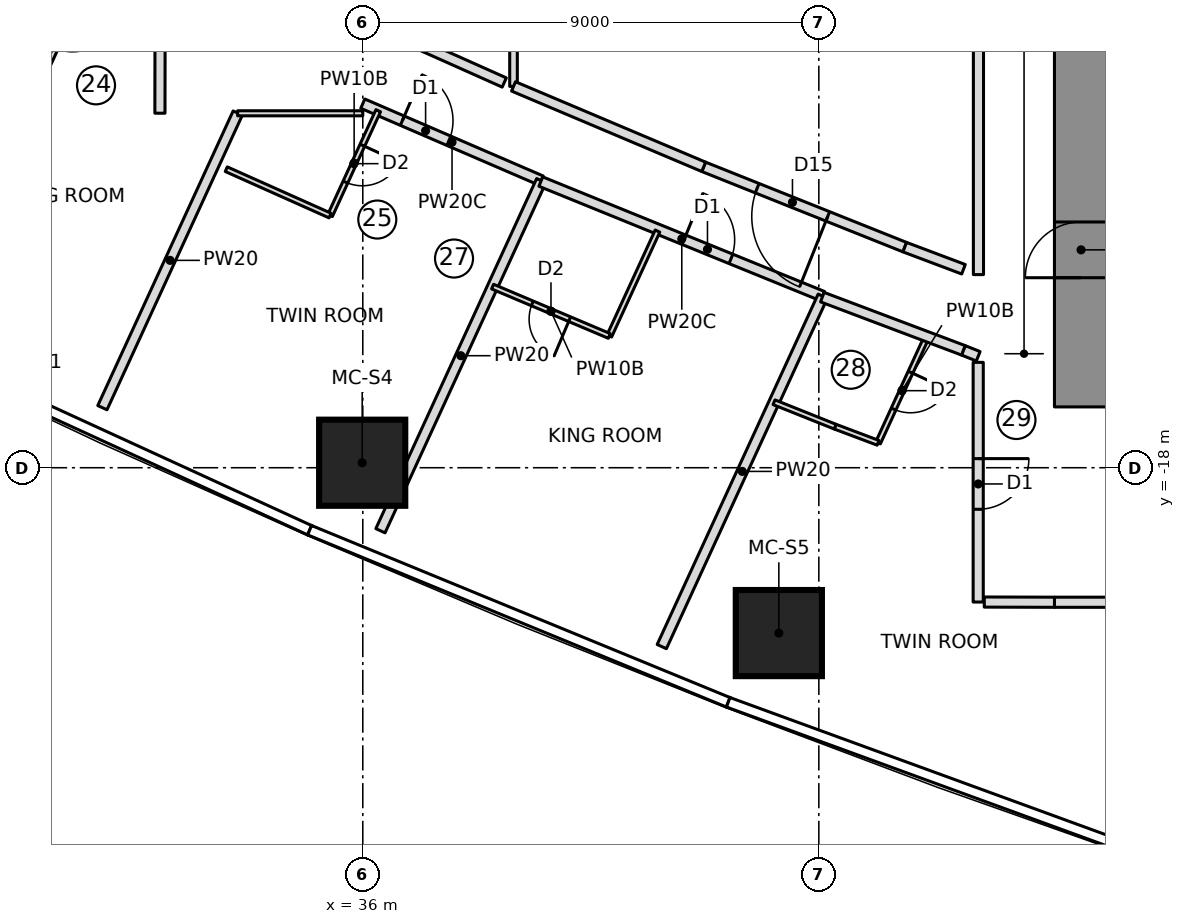
"""IFC4 building model, lengths in metres.
Left out: names, types, materials, properties, quantities, classifications, styles, units other than length and angle.
Written with IfcOpenShell. Run it as: python <this file> out.ifc"""

import sys

from ifc_helpers import new_model, si_unit, direction, frame, frame_2d, origin, origin_2d, place, context, subcontext, project, spatial, rectangle, extrude, element, fill, save


model = new_model("IFC4")
c1 = context("Model", 3, precision=1e-05, world=origin(), true_north=direction((0.0, 1.0)))
c2 = subcontext(c1, "Body", "Model", "MODEL_VIEW")
j1 = project(units=[si_unit("LENGTHUNIT", "METRE"), si_unit("PLANEANGLEUNIT", "RADIAN")], contexts=[c1])
p1 = place(None, origin())
s1 = spatial("IfcSite", under=j1, at=p1, CompositionType="ELEMENT")
p2 = place(p1, origin())
s2 = spatial("IfcBuilding", under=s1, at=p2, CompositionType="ELEMENT")
p3 = place(p2, frame((0.0, 0.0, 106.2)))
s3 = spatial("IfcBuildingStorey", under=s2, at=p3, CompositionType="ELEMENT", Elevation=106.2)
p4 = place(p3, frame((50.175, -16.8, 0.0), z_axis=(0.0, 0.0, 1.0), x_axis=(0.0, 1.0, 0.0)))
e1 = element("IfcWall", 1, at=p4, inside=s3, PredefinedType="SHEAR", context=c2, shape_type="SweptSolid", body=[
    extrude(rectangle(XDim=10.15, YDim=1.05, at=frame_2d((5.075, 0.0))), origin(), (0.0, 0.0, 1.0), 3.55),
])
p5 = place(p4, frame((2.55, 0.0, 0.0)))
e2 = element("IfcOpeningElement", 2, at=p5, cuts=e1, PredefinedType="OPENING", context=c2, shape_type="SweptSolid", body=[
    extrude(rectangle(XDim=1.1, YDim=2.1, at=frame_2d((0.55, 1.05))), frame((0.0, 0.535, 0.0), z_axis=(0.0, -1.0, 0.0), x_axis=(1.0, 0.0, 0.0)), (0.0, 0.0, 1.0), 1.07),
])
for number, where, z_axis, x_axis in (
    (3, (35.988, -17.902, 0.0), (0.0, 0.0, 1.0), (1.0, 0.0, 0.0)),
    (4, (44.211, -21.264, 0.0), (0.0, 0.0, 1.0), (1.0, 0.0, 0.0)),
):
    element("IfcColumn", number, at=place(p3, frame(where, z_axis=z_axis, x_axis=x_axis)), inside=s3, PredefinedType="COLUMN", context=c2, shape_type="SweptSolid", body=[
        extrude(rectangle(XDim=1.7, YDim=1.7, at=origin_2d()), origin(), (0.0, 0.0, 1.0), 3.55),
    ])
p6 = place(p3, frame((30.586, -8.31, 0.0), z_axis=(0.0, 0.0, 1.0), x_axis=(-0.417466676952, -0.908692232626, 0.0)))
e5 = element("IfcWall", 5, at=p6, inside=s3, PredefinedType="PARTITIONING", context=c2, shape_type="SweptSolid", body=[
    extrude(rectangle(XDim=2.277, YDim=0.1, at=frame_2d((1.139, 0.0))), origin(), (0.0, 0.0, 1.0), 3.25),
])
p7 = place(p6, frame((0.75, 0.0, 0.0)))
e6 = element("IfcOpeningElement", 6, at=p7, cuts=e5, PredefinedType="OPENING", context=c2, shape_type="SweptSolid", body=[
    extrude(rectangle(XDim=0.8, YDim=2.1, at=frame_2d((0.4, 1.05))), frame((0.0, 0.06, 0.0), z_axis=(0.0, -1.0, 0.0), x_axis=(1.0, 0.0, 0.0)), (0.0, 0.0, 1.0), 0.12),
])
p8 = place(p3, frame((30.861, -16.815, 0.0), z_axis=(0.0, 0.0, 1.0), x_axis=(0.417441426461, 0.908703832651, 0.0)))
e7 = element("IfcWall", 7, at=p8, inside=s3, PredefinedType="PARTITIONING", context=c2, shape_type="SweptSolid", body=[
    extrude(rectangle(XDim=6.399, YDim=0.2, at=frame_2d((3.2, 0.0))), origin(), (0.0, 0.0, 1.0), 3.25),
])
p9 = place(p3, frame((36.0, -10.815, 0.0), z_axis=(0.0, 0.0, 1.0), x_axis=(0.918174446699, -0.396176331233, 0.0)))
e8 = element("IfcWall", 8, at=p9, inside=s3, PredefinedType="PARTITIONING", context=c2, shape_type="SweptSolid", body=[
    extrude(rectangle(XDim=3.836, YDim=0.2, at=frame_2d((1.918, 0.0))), origin(), (0.0, 0.0, 1.0), 3.25),
])
p10 = place(p9, frame((0.85, 0.0, 0.0)))
e9 = element("IfcOpeningElement", 9, at=p10, cuts=e8, PredefinedType="OPENING", context=c2, shape_type="SweptSolid", body=[
    extrude(rectangle(XDim=1.0, YDim=2.1, at=frame_2d((0.5, 1.05))), frame((0.0, 0.11, 0.0), z_axis=(0.0, -1.0, 0.0), x_axis=(1.0, 0.0, 0.0)), (0.0, 0.0, 1.0), 0.22),
])
p11 = place(p3, frame((36.305, -10.954, 0.0), z_axis=(0.0, 0.0, 1.0), x_axis=(-0.41750734959, -0.908673545911, 0.0)))
e10 = element("IfcWall", 10, at=p11, inside=s3, PredefinedType="PARTITIONING", context=c2, shape_type="SweptSolid", body=[
    extrude(rectangle(XDim=2.277, YDim=0.1, at=frame_2d((1.139, 0.0))), origin(), (0.0, 0.0, 1.0), 3.25),
])
p12 = place(p11, frame((0.75, 0.0, 0.0)))
e11 = element("IfcOpeningElement", 11, at=p12, cuts=e10, PredefinedType="OPENING", context=c2, shape_type="SweptSolid", body=[
    extrude(rectangle(XDim=0.8, YDim=2.1, at=frame_2d((0.4, 1.05))), frame((0.0, 0.06, 0.0), z_axis=(0.0, -1.0, 0.0), x_axis=(1.0, 0.0, 0.0)), (0.0, 0.0, 1.0), 0.12),
])
p13 = place(p3, frame((35.354, -13.023, 0.0), z_axis=(0.0, 0.0, 1.0), x_axis=(-0.913060453705, 0.407824236504, 0.0)))
e12 = element("IfcWall", 12, at=p13, inside=s3, PredefinedType="PARTITIONING", context=c2, shape_type="SweptSolid", body=[
    extrude(rectangle(XDim=2.243, YDim=0.1, at=frame_2d((1.122, 0.0))), origin(), (0.0, 0.0, 1.0), 3.25),
])
p14 = place(p3, frame((36.348, -19.244, 0.0), z_axis=(0.0, 0.0, 1.0), x_axis=(0.417442847913, 0.908703179661, 0.0)))
e13 = element("IfcWall", 13, at=p14, inside=s3, PredefinedType="PARTITIONING", context=c2, shape_type="SweptSolid", body=[
    extrude(rectangle(XDim=7.604, YDim=0.2, at=frame_2d((3.802, 0.0))), origin(), (0.0, 0.0, 1.0), 3.25),
])
p15 = place(p3, frame((39.514, -12.353, 0.0), z_axis=(0.0, 0.0, 1.0), x_axis=(0.926327862679, -0.376718317613, 0.0)))
e14 = element("IfcWall", 14, at=p15, inside=s3, PredefinedType="PARTITIONING", context=c2, shape_type="SweptSolid", body=[
    extrude(rectangle(XDim=6.006, YDim=0.2, at=frame_2d((3.003, 0.0))), origin(), (0.0, 0.0, 1.0), 3.25),
])
p16 = place(p15, frame((3.05, 0.0, 0.0)))
e15 = element("IfcOpeningElement", 15, at=p16, cuts=e14, PredefinedType="OPENING", context=c2, shape_type="SweptSolid", body=[
    extrude(rectangle(XDim=1.0, YDim=2.1, at=frame_2d((0.5, 1.05))), frame((0.0, 0.11, 0.0), z_axis=(0.0, -1.0, 0.0), x_axis=(1.0, 0.0, 0.0)), (0.0, 0.0, 1.0), 0.22),
])
p17 = place(p3, frame((41.816, -13.33, 0.0), z_axis=(0.0, 0.0, 1.0), x_axis=(-0.417433204355, -0.908707609686, 0.0)))
e16 = element("IfcWall", 16, at=p17, inside=s3, PredefinedType="PARTITIONING", context=c2, shape_type="SweptSolid", body=[
    extrude(rectangle(XDim=2.278, YDim=0.1, at=frame_2d((1.139, 0.0))), origin(), (0.0, 0.0, 1.0), 3.25),
])
p18 = place(p3, frame((40.865, -15.4, 0.0), z_axis=(0.0, 0.0, 1.0), x_axis=(-0.921042675983, 0.38946166566, 0.0)))
e17 = element("IfcWall", 17, at=p18, inside=s3, PredefinedType="PARTITIONING", context=c2, shape_type="SweptSolid", body=[
    extrude(rectangle(XDim=2.501, YDim=0.1, at=frame_2d((1.25, 0.0))), origin(), (0.0, 0.0, 1.0), 3.25),
])
p19 = place(p18, frame((0.85, 0.0, 0.0)))
e18 = element("IfcOpeningElement", 18, at=p19, cuts=e17, PredefinedType="OPENING", context=c2, shape_type="SweptSolid", body=[
    extrude(rectangle(XDim=0.8, YDim=2.1, at=frame_2d((0.4, 1.05))), frame((0.0, 0.06, 0.0), z_axis=(0.0, -1.0, 0.0), x_axis=(1.0, 0.0, 0.0)), (0.0, 0.0, 1.0), 0.12),
])
p20 = place(p3, frame((41.901, -21.53, 0.0), z_axis=(0.0, 0.0, 1.0), x_axis=(0.417427858403, 0.908710065438, 0.0)))
e19 = element("IfcWall", 19, at=p20, inside=s3, PredefinedType="PARTITIONING", context=c2, shape_type="SweptSolid", body=[
    extrude(rectangle(XDim=7.61, YDim=0.2, at=frame_2d((3.805, 0.0))), origin(), (0.0, 0.0, 1.0), 3.25),
])
p21 = place(p3, frame((47.122, -15.434, 0.0), z_axis=(0.0, 0.0, 1.0), x_axis=(-0.417409478396, -0.90871850831, 0.0)))
e20 = element("IfcWall", 20, at=p21, inside=s3, PredefinedType="PARTITIONING", context=c2, shape_type="SweptSolid", body=[
    extrude(rectangle(XDim=2.283, YDim=0.1, at=frame_2d((1.142, 0.0))), origin(), (0.0, 0.0, 1.0), 3.25),
])
p22 = place(p21, frame((0.75, 0.0, 0.0)))
e21 = element("IfcOpeningElement", 21, at=p22, cuts=e20, PredefinedType="OPENING", context=c2, shape_type="SweptSolid", body=[
    extrude(rectangle(XDim=0.8, YDim=2.1, at=frame_2d((0.4, 1.05))), frame((0.0, 0.06, 0.0), z_axis=(0.0, -1.0, 0.0), x_axis=(1.0, 0.0, 0.0)), (0.0, 0.0, 1.0), 0.12),
])
p23 = place(p3, frame((46.169, -17.509, 0.0), z_axis=(0.0, 0.0, 1.0), x_axis=(-0.935885332459, 0.352304760808, 0.0)))
e22 = element("IfcWall", 22, at=p23, inside=s3, PredefinedType="PARTITIONING", context=c2, shape_type="SweptSolid", body=[
    extrude(rectangle(XDim=0.906, YDim=0.1, at=frame_2d((0.453, 0.0))), origin(), (0.0, 0.0, 1.0), 3.25),
])
p24 = place(p3, frame((45.321, -17.19, 0.0), z_axis=(0.0, 0.0, 1.0), x_axis=(-0.928593389657, 0.371098796393, 0.0)))
e23 = element("IfcWall", 23, at=p24, inside=s3, PredefinedType="PARTITIONING", context=c2, shape_type="SweptSolid", body=[
    extrude(rectangle(XDim=1.298, YDim=0.1, at=frame_2d((0.649, 0.0))), origin(), (0.0, 0.0, 1.0), 3.25),
])
p25 = place(p3, frame((38.792, -10.397, 0.0), z_axis=(0.0, 0.0, 1.0), x_axis=(-0.913029587861, 0.407893333716, 0.0)))
e24 = element("IfcWall", 24, at=p25, inside=s3, PredefinedType="PARTITIONING", context=c2, shape_type="SweptSolid", body=[
    extrude(rectangle(XDim=3.058, YDim=0.2, at=frame_2d((1.529, 0.0))), origin(), (0.0, 0.0, 1.0), 3.25),
])
p26 = place(p3, frame((38.975, -10.474, 0.0), z_axis=(0.0, 0.0, 1.0), x_axis=(0.0, 1.0, 0.0)))
e25 = element("IfcWall", 25, at=p26, inside=s3, PredefinedType="PARTITIONING", context=c2, shape_type="SweptSolid", body=[
    extrude(rectangle(XDim=20.949, YDim=0.15, at=frame_2d((10.474, 0.0))), origin(), (0.0, 0.0, 1.0), 3.25),
])
p27 = place(p3, frame((46.696, -13.647, 0.0), z_axis=(0.0, 0.0, 1.0), x_axis=(-0.928638161177, 0.370986745864, 0.0)))
e26 = element("IfcWall", 26, at=p27, inside=s3, PredefinedType="PARTITIONING", context=c2, shape_type="SweptSolid", body=[
    extrude(rectangle(XDim=4.273, YDim=0.2, at=frame_2d((2.136, 0.0))), origin(), (0.0, 0.0, 1.0), 3.25),
])
p28 = place(p27, frame((1.636, 0.0, 0.0)))
e27 = element("IfcOpeningElement", 27, at=p28, cuts=e26, PredefinedType="OPENING", context=c2, shape_type="SweptSolid", body=[
    extrude(rectangle(XDim=1.5, YDim=2.1, at=frame_2d((0.75, 1.05))), frame((0.0, 0.11, 0.0), z_axis=(0.0, -1.0, 0.0), x_axis=(1.0, 0.0, 0.0)), (0.0, 0.0, 1.0), 0.22),
])
p29 = place(p3, frame((42.728, -12.062, 0.0), z_axis=(0.0, 0.0, 1.0), x_axis=(-0.921030909625, 0.389489490891, 0.0)))
e28 = element("IfcWall", 28, at=p29, inside=s3, PredefinedType="PARTITIONING", context=c2, shape_type="SweptSolid", body=[
    extrude(rectangle(XDim=4.075, YDim=0.2, at=frame_2d((2.038, 0.0))), origin(), (0.0, 0.0, 1.0), 3.25),
])
p30 = place(p3, frame((49.65, -20.655, 0.0), z_axis=(0.0, 0.0, 1.0), x_axis=(1.0, 0.0, 0.0)))
e29 = element("IfcWall", 29, at=p30, inside=s3, PredefinedType="PARTITIONING", context=c2, shape_type="SweptSolid", body=[
    extrude(rectangle(XDim=4.976, YDim=0.2, at=frame_2d((2.488, 0.0))), origin(), (0.0, 0.0, 1.0), 3.25),
])
p31 = place(p30, frame((1.988, 0.0, 0.0)))
e30 = element("IfcOpeningElement", 30, at=p31, cuts=e29, PredefinedType="OPENING", context=c2, shape_type="SweptSolid", body=[
    extrude(rectangle(XDim=1.5, YDim=2.1, at=frame_2d((0.75, 1.05))), frame((0.0, 0.11, 0.0), z_axis=(0.0, -1.0, 0.0), x_axis=(1.0, 0.0, 0.0)), (0.0, 0.0, 1.0), 0.22),
])
p32 = place(p3, frame((33.53, -11.005, 0.0), z_axis=(0.0, 0.0, 1.0), x_axis=(1.0, 0.0, 0.0)))
e31 = element("IfcWall", 31, at=p32, inside=s3, PredefinedType="PARTITIONING", context=c2, shape_type="SweptSolid", body=[
    extrude(rectangle(XDim=2.47, YDim=0.1, at=frame_2d((1.235, 0.0))), origin(), (0.0, 0.0, 1.0), 3.25),
])
p33 = place(p3, frame((45.069, -14.634, 0.0), z_axis=(0.0, 0.0, 1.0), x_axis=(0.93564003724, -0.352955692282, 0.0)))
e32 = element("IfcWall", 32, at=p33, inside=s3, PredefinedType="PARTITIONING", context=c2, shape_type="SweptSolid", body=[
    extrude(rectangle(XDim=2.978, YDim=0.2, at=frame_2d((1.489, 0.0))), origin(), (0.0, 0.0, 1.0), 3.25),
])
p34 = place(p3, frame((47.855, -14.083, 0.0), z_axis=(0.0, 0.0, 1.0), x_axis=(-0.935907269358, 0.352246480696, 0.0)))
e33 = element("IfcWall", 33, at=p34, inside=s3, PredefinedType="PARTITIONING", context=c2, shape_type="SweptSolid", body=[
    extrude(rectangle(XDim=1.239, YDim=0.2, at=frame_2d((0.619, 0.0))), origin(), (0.0, 0.0, 1.0), 3.25),
])
p35 = place(p3, frame((48.15, 14.189, 0.0), z_axis=(0.0, 0.0, 1.0), x_axis=(0.0, -1.0, 0.0)))
e34 = element("IfcWall", 34, at=p35, inside=s3, PredefinedType="PARTITIONING", context=c2, shape_type="SweptSolid", body=[
    extrude(rectangle(XDim=28.377, YDim=0.2, at=frame_2d((14.189, 0.0))), origin(), (0.0, 0.0, 1.0), 3.25),
])
p36 = place(p3, frame((32.0, -8.951, 0.0), z_axis=(0.0, 0.0, 1.0), x_axis=(-0.001665276625, -0.999998613426, 0.0)))
e35 = element("IfcWall", 35, at=p36, inside=s3, PredefinedType="PARTITIONING", context=c2, shape_type="SweptSolid", body=[
    extrude(rectangle(XDim=2.052, YDim=0.2, at=frame_2d((1.026, 0.0))), origin(), (0.0, 0.0, 1.0), 3.25),
])
p37 = place(p3, frame((47.855, -15.685, 0.0), z_axis=(0.0, 0.0, 1.0), x_axis=(0.928638194287, -0.370986662983, 0.0)))
e36 = element("IfcWall", 36, at=p37, inside=s3, PredefinedType="PARTITIONING", context=c2, shape_type="SweptSolid", body=[
    extrude(rectangle(XDim=0.312, YDim=0.2, at=frame_2d((0.156, 0.0))), origin(), (0.0, 0.0, 1.0), 3.25),
])
p38 = place(p3, frame((48.145, -15.92, 0.0), z_axis=(0.0, 0.0, 1.0), x_axis=(-5.1610239e-05, -0.999999998668, 0.0)))
e37 = element("IfcWall", 37, at=p38, inside=s3, PredefinedType="PARTITIONING", context=c2, shape_type="SweptSolid", body=[
    extrude(rectangle(XDim=4.73, YDim=0.2, at=frame_2d((2.365, 0.0))), origin(), (0.0, 0.0, 1.0), 3.25),
])
p39 = place(p38, frame((1.9, 0.0, 0.0)))
e38 = element("IfcOpeningElement", 38, at=p39, cuts=e37, PredefinedType="OPENING", context=c2, shape_type="SweptSolid", body=[
    extrude(rectangle(XDim=1.0, YDim=2.1, at=frame_2d((0.5, 1.05))), frame((0.0, 0.11, 0.0), z_axis=(0.0, -1.0, 0.0), x_axis=(1.0, 0.0, 0.0)), (0.0, 0.0, 1.0), 0.22),
])
p40 = place(p3, frame((48.265, -20.651, 0.0), z_axis=(0.0, 0.0, 1.0), x_axis=(0.999996503144, -0.002644560569, 0.0)))
e39 = element("IfcWall", 39, at=p40, inside=s3, PredefinedType="PARTITIONING", context=c2, shape_type="SweptSolid", body=[
    extrude(rectangle(XDim=1.385, YDim=0.2, at=frame_2d((0.692, 0.0))), origin(), (0.0, 0.0, 1.0), 3.25),
])
p41 = place(p12, origin())
e40 = element("IfcDoor", 40, at=p41, inside=s3, OperationType="SINGLE_SWING_LEFT", PredefinedType="DOOR", context=c2, shape_type="SweptSolid", body=[
    extrude(rectangle(XDim=0.8, YDim=2.1, at=frame_2d((0.4, 1.05))), frame((0.0, 0.025, 0.0), z_axis=(0.0, -1.0, 0.0), x_axis=(1.0, 0.0, 0.0)), (0.0, 0.0, 1.0), 0.05),
])
fill(e11, e40)
p42 = place(p10, origin())
e41 = element("IfcDoor", 41, at=p42, inside=s3, OperationType="SINGLE_SWING_LEFT", PredefinedType="DOOR", context=c2, shape_type="SweptSolid", body=[
    extrude(rectangle(XDim=1.0, YDim=2.1, at=frame_2d((0.5, 1.05))), frame((0.0, 0.025, 0.0), z_axis=(0.0, -1.0, 0.0), x_axis=(1.0, 0.0, 0.0)), (0.0, 0.0, 1.0), 0.05),
])
fill(e9, e41)
p43 = place(p19, origin())
e42 = element("IfcDoor", 42, at=p43, inside=s3, OperationType="SINGLE_SWING_LEFT", PredefinedType="DOOR", context=c2, shape_type="SweptSolid", body=[
    extrude(rectangle(XDim=0.8, YDim=2.1, at=frame_2d((0.4, 1.05))), frame((0.0, 0.025, 0.0), z_axis=(0.0, -1.0, 0.0), x_axis=(1.0, 0.0, 0.0)), (0.0, 0.0, 1.0), 0.05),
])
fill(e18, e42)
p44 = place(p16, origin())
e43 = element("IfcDoor", 43, at=p44, inside=s3, OperationType="SINGLE_SWING_LEFT", PredefinedType="DOOR", context=c2, shape_type="SweptSolid", body=[
    extrude(rectangle(XDim=1.0, YDim=2.1, at=frame_2d((0.5, 1.05))), frame((0.0, 0.025, 0.0), z_axis=(0.0, -1.0, 0.0), x_axis=(1.0, 0.0, 0.0)), (0.0, 0.0, 1.0), 0.05),
])
fill(e15, e43)
p45 = place(p22, origin())
e44 = element("IfcDoor", 44, at=p45, inside=s3, OperationType="SINGLE_SWING_LEFT", PredefinedType="DOOR", context=c2, shape_type="SweptSolid", body=[
    extrude(rectangle(XDim=0.8, YDim=2.1, at=frame_2d((0.4, 1.05))), frame((0.0, 0.025, 0.0), z_axis=(0.0, -1.0, 0.0), x_axis=(1.0, 0.0, 0.0)), (0.0, 0.0, 1.0), 0.05),
])
fill(e21, e44)
p46 = place(p28, origin())
e45 = element("IfcDoor", 45, at=p46, inside=s3, OperationType="DOUBLE_DOOR_SINGLE_SWING", PredefinedType="DOOR", context=c2, shape_type="SweptSolid", body=[
    extrude(rectangle(XDim=1.5, YDim=2.1, at=frame_2d((0.75, 1.05))), frame((0.0, 0.025, 0.0), z_axis=(0.0, -1.0, 0.0), x_axis=(1.0, 0.0, 0.0)), (0.0, 0.0, 1.0), 0.05),
])
fill(e27, e45)
p47 = place(p39, origin())
e46 = element("IfcDoor", 46, at=p47, inside=s3, OperationType="SINGLE_SWING_LEFT", PredefinedType="DOOR", context=c2, shape_type="SweptSolid", body=[
    extrude(rectangle(XDim=1.0, YDim=2.1, at=frame_2d((0.5, 1.05))), frame((0.0, 0.025, 0.0), z_axis=(0.0, -1.0, 0.0), x_axis=(1.0, 0.0, 0.0)), (0.0, 0.0, 1.0), 0.05),
])
fill(e38, e46)
p48 = place(p5, origin())
e47 = element("IfcDoor", 47, at=p48, inside=s3, OperationType="SINGLE_SWING_RIGHT", PredefinedType="DOOR", context=c2, shape_type="SweptSolid", body=[
    extrude(rectangle(XDim=1.1, YDim=2.1, at=frame_2d((0.55, 1.05))), frame((0.0, 0.025, 0.0), z_axis=(0.0, -1.0, 0.0), x_axis=(1.0, 0.0, 0.0)), (0.0, 0.0, 1.0), 0.05),
])
fill(e2, e47)
save(model, sys.argv[1])
